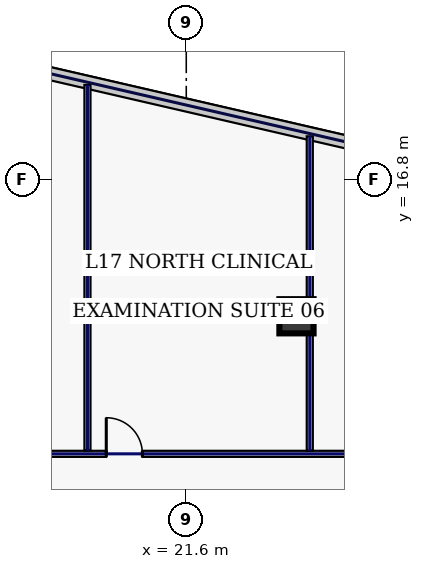
"""IFC4 building model, lengths in metres.
Left out: names, types, materials, properties, quantities, classifications, styles, units other than length and angle.
Written with IfcOpenShell. Run it as: python <this file> out.ifc"""

import sys

from ifc_helpers import new_model, si_unit, direction, frame, frame_2d, origin, origin_2d, place, context, subcontext, project, spatial, rectangle, hollow_rectangle, extrude, element, fill, save


model = new_model("IFC4")
c1 = context("Model", 3, precision=1e-05, world=origin(), true_north=direction((0.0, 1.0)))
c2 = subcontext(c1, "Body", "Model", "MODEL_VIEW")
j1 = project(units=[si_unit("LENGTHUNIT", "METRE"), si_unit("PLANEANGLEUNIT", "RADIAN")], contexts=[c1])
p1 = place(None, origin())
s1 = spatial("IfcSite", under=j1, at=p1, CompositionType="ELEMENT")
p2 = place(p1, origin())
s2 = spatial("IfcBuilding", under=s1, at=p2, CompositionType="ELEMENT")
p3 = place(p2, frame((0.0, 0.0, 79.4)))
s3 = spatial("IfcBuildingStorey", under=s2, at=p3, CompositionType="ELEMENT", Elevation=79.4)
p4 = place(p3, frame((24.5, 13.2, 0.0), z_axis=(0.0, 0.0, 1.0), x_axis=(1.0, 0.0, 0.0)))
e1 = element("IfcColumn", 1, at=p4, inside=s3, PredefinedType="COLUMN", context=c2, shape_type="SweptSolid", body=[
    extrude(hollow_rectangle(XDim=0.9, YDim=0.9, WallThickness=0.04, at=origin_2d()), origin(), (0.0, 0.0, 1.0), 3.68),
])
p5 = place(p3, frame((37.229, 15.15, 0.0), z_axis=(0.0, 0.0, 1.0), x_axis=(-0.97436993772, 0.224951604723, 0.0)))
e2 = element("IfcWall", 2, at=p5, inside=s3, PredefinedType="STANDARD", context=c2, shape_type="SweptSolid", body=[
    extrude(rectangle(XDim=22.651, YDim=0.34, at=frame_2d((11.326, 0.0))), origin(), (0.0, 0.0, 1.0), 3.68),
])
p6 = place(p5, frame((2.512, 0.0, 0.22)))
e3 = element("IfcOpeningElement", 3, at=p6, cuts=e2, PredefinedType="OPENING", context=c2, shape_type="SweptSolid", body=[
    extrude(rectangle(XDim=1.6, YDim=1.2, at=frame_2d((0.8, 0.6))), frame((0.0, 0.18, 0.0), z_axis=(0.0, -1.0, 0.0), x_axis=(1.0, 0.0, 0.0)), (0.0, 0.0, 1.0), 0.36),
])
p7 = place(p3, frame((-18.235, 9.58, 0.0), z_axis=(0.0, 0.0, 1.0), x_axis=(1.0, 0.0, 0.0)))
e4 = element("IfcWall", 4, at=p7, inside=s3, PredefinedType="PARTITIONING", context=c2, shape_type="SweptSolid", body=[
    extrude(rectangle(XDim=47.65, YDim=0.16, at=frame_2d((23.825, 0.0))), origin(), (0.0, 0.0, 1.0), 3.68),
])
p8 = place(p7, frame((6.01, 0.0, 0.0)))
e5 = element("IfcOpeningElement", 5, at=p8, cuts=e4, PredefinedType="OPENING", context=c2, shape_type="SweptSolid", body=[
    extrude(rectangle(XDim=1.3, YDim=2.2, at=frame_2d((0.65, 1.1))), frame((0.0, 0.09, 0.0), z_axis=(0.0, -1.0, 0.0), x_axis=(1.0, 0.0, 0.0)), (0.0, 0.0, 1.0), 0.18),
])
p9 = place(p7, frame((12.285, 0.0, 0.0)))
e6 = element("IfcOpeningElement", 6, at=p9, cuts=e4, PredefinedType="OPENING", context=c2, shape_type="SweptSolid", body=[
    extrude(rectangle(XDim=0.95, YDim=2.2, at=frame_2d((0.475, 1.1))), frame((0.0, 0.09, 0.0), z_axis=(0.0, -1.0, 0.0), x_axis=(1.0, 0.0, 0.0)), (0.0, 0.0, 1.0), 0.18),
])
p10 = place(p7, frame((17.67, 0.0, 0.0)))
e7 = element("IfcOpeningElement", 7, at=p10, cuts=e4, PredefinedType="OPENING", context=c2, shape_type="SweptSolid", body=[
    extrude(rectangle(XDim=0.95, YDim=2.2, at=frame_2d((0.475, 1.1))), frame((0.0, 0.09, 0.0), z_axis=(0.0, -1.0, 0.0), x_axis=(1.0, 0.0, 0.0)), (0.0, 0.0, 1.0), 0.18),
])
p11 = place(p7, frame((23.67, 0.0, 0.0)))
e8 = element("IfcOpeningElement", 8, at=p11, cuts=e4, PredefinedType="OPENING", context=c2, shape_type="SweptSolid", body=[
    extrude(rectangle(XDim=0.95, YDim=2.2, at=frame_2d((0.475, 1.1))), frame((0.0, 0.09, 0.0), z_axis=(0.0, -1.0, 0.0), x_axis=(1.0, 0.0, 0.0)), (0.0, 0.0, 1.0), 0.18),
])
p12 = place(p7, frame((31.47, 0.0, 0.0)))
e9 = element("IfcOpeningElement", 9, at=p12, cuts=e4, PredefinedType="OPENING", context=c2, shape_type="SweptSolid", body=[
    extrude(rectangle(XDim=1.3, YDim=2.2, at=frame_2d((0.65, 1.1))), frame((0.0, 0.09, 0.0), z_axis=(0.0, -1.0, 0.0), x_axis=(1.0, 0.0, 0.0)), (0.0, 0.0, 1.0), 0.18),
])
p13 = place(p7, frame((37.73, 0.0, 0.0)))
e10 = element("IfcOpeningElement", 10, at=p13, cuts=e4, PredefinedType="OPENING", context=c2, shape_type="SweptSolid", body=[
    extrude(rectangle(XDim=0.95, YDim=2.2, at=frame_2d((0.475, 1.1))), frame((0.0, 0.09, 0.0), z_axis=(0.0, -1.0, 0.0), x_axis=(1.0, 0.0, 0.0)), (0.0, 0.0, 1.0), 0.18),
])
p14 = place(p7, frame((45.786, 0.0, 0.0)))
e11 = element("IfcOpeningElement", 11, at=p14, cuts=e4, PredefinedType="OPENING", context=c2, shape_type="SweptSolid", body=[
    extrude(rectangle(XDim=0.95, YDim=2.2, at=frame_2d((0.475, 1.1))), frame((0.0, 0.09, 0.0), z_axis=(0.0, -1.0, 0.0), x_axis=(1.0, 0.0, 0.0)), (0.0, 0.0, 1.0), 0.18),
])
p15 = place(p3, frame((19.0, 9.665, 0.0), z_axis=(0.0, 0.0, 1.0), x_axis=(0.0, 1.0, 0.0)))
e12 = element("IfcWall", 12, at=p15, inside=s3, PredefinedType="PARTITIONING", context=c2, shape_type="SweptSolid", body=[
    extrude(rectangle(XDim=9.622, YDim=0.16, at=frame_2d((4.811, 0.0))), origin(), (0.0, 0.0, 1.0), 1.475),
])
p16 = place(p3, frame((24.85, 9.665, 0.0), z_axis=(0.0, 0.0, 1.0), x_axis=(0.0, 1.0, 0.0)))
e13 = element("IfcWall", 13, at=p16, inside=s3, PredefinedType="PARTITIONING", context=c2, shape_type="SweptSolid", body=[
    extrude(rectangle(XDim=8.271, YDim=0.16, at=frame_2d((4.135, 0.0))), origin(), (0.0, 0.0, 1.0), 3.68),
])
p17 = place(p13, origin())
e14 = element("IfcDoor", 14, at=p17, inside=s3, OperationType="SINGLE_SWING_LEFT", PredefinedType="DOOR", context=c2, shape_type="SweptSolid", body=[
    extrude(rectangle(XDim=0.95, YDim=2.2, at=frame_2d((0.475, 1.1))), frame((0.0, 0.025, 0.0), z_axis=(0.0, -1.0, 0.0), x_axis=(1.0, 0.0, 0.0)), (0.0, 0.0, 1.0), 0.05),
])
fill(e10, e14)
save(model, sys.argv[1])
